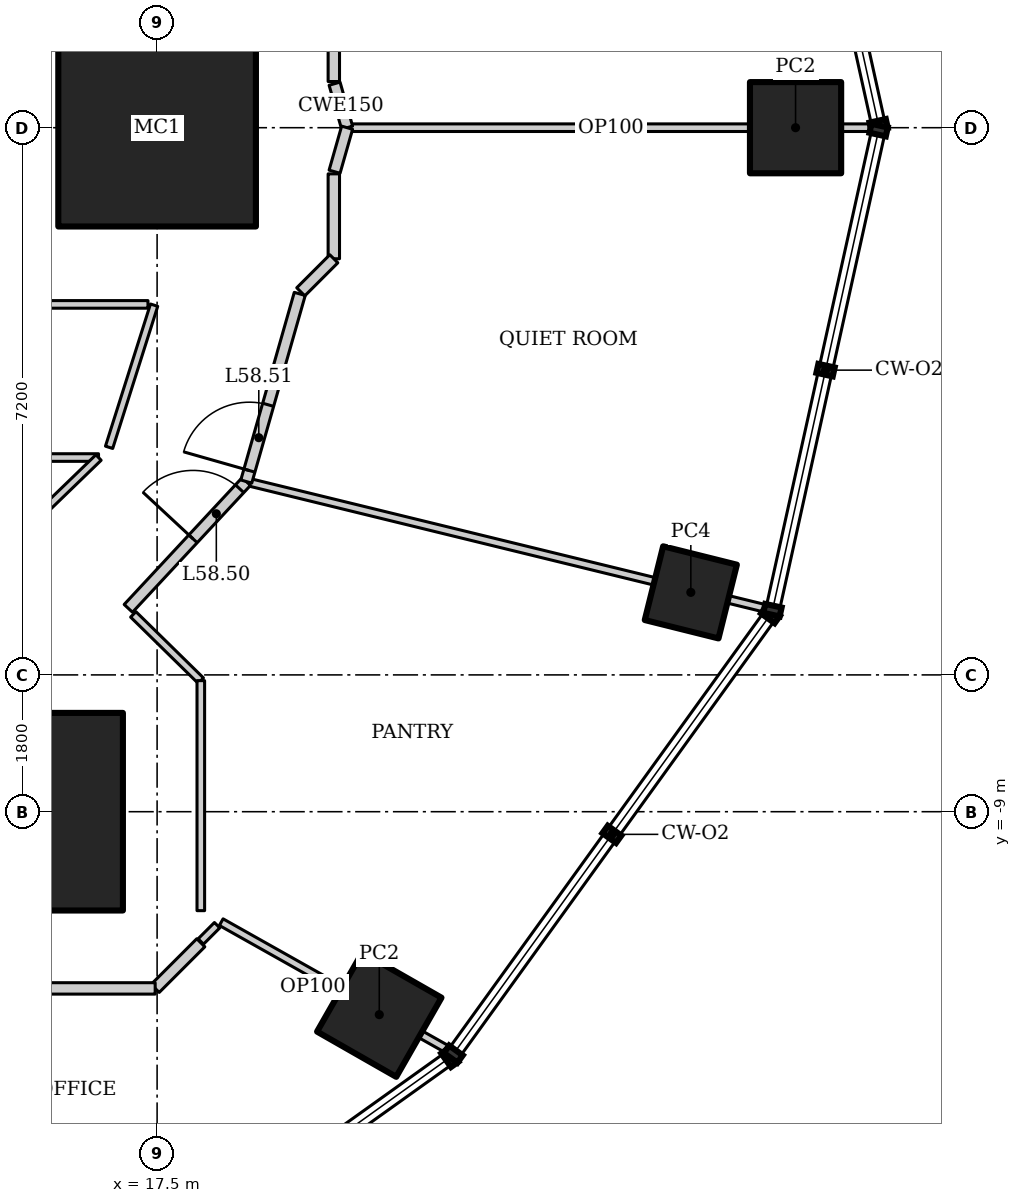
"""IFC4 building model, lengths in metres.
Left out: names, types, materials, properties, quantities, classifications, styles, units other than length and angle.
Written with IfcOpenShell. Run it as: python <this file> out.ifc"""

import sys

from ifc_helpers import new_model, si_unit, direction, frame, frame_2d, origin, origin_2d, place, context, subcontext, project, spatial, rectangle, hollow_rectangle, extrude, element, fill, save


model = new_model("IFC4")
c1 = context("Model", 3, precision=1e-05, world=origin(), true_north=direction((0.0, 1.0)))
c2 = subcontext(c1, "Body", "Model", "MODEL_VIEW")
j1 = project(units=[si_unit("LENGTHUNIT", "METRE"), si_unit("PLANEANGLEUNIT", "RADIAN")], contexts=[c1])
p1 = place(None, origin())
s1 = spatial("IfcSite", under=j1, at=p1, CompositionType="ELEMENT")
p2 = place(p1, origin())
s2 = spatial("IfcBuilding", under=s1, at=p2, CompositionType="ELEMENT")
p3 = place(p2, frame((0.0, 0.0, 249.4)))
s3 = spatial("IfcBuildingStorey", under=s2, at=p3, CompositionType="ELEMENT", Elevation=249.4)
for number, where, z_axis, x_axis in (
    (1, (17.5, 0.0, 0.0), (0.0, 0.0, 1.0), (1.0, 0.0, 0.0)),
    (2, (15.75, -9.0, 0.0), (0.0, 0.0, 1.0), (1.0, 0.0, 0.0)),
):
    element("IfcColumn", number, at=place(p3, frame(where, z_axis=z_axis, x_axis=x_axis)), inside=s3, PredefinedType="COLUMN", context=c2, shape_type="SweptSolid", body=[
        extrude(hollow_rectangle(XDim=2.6, YDim=2.6, WallThickness=0.13, at=origin_2d()), origin(), (0.0, 0.0, 1.0), 4.2),
    ])
for number, where, z_axis, x_axis in (
    (3, (25.9, 0.0, 0.0), (0.0, 0.0, 1.0), (1.0, 0.0, 0.0)),
    (4, (20.423, -11.67, 0.0), (0.0, 0.0, 1.0), (0.496, 0.868, 0.0)),
):
    element("IfcColumn", number, at=place(p3, frame(where, z_axis=z_axis, x_axis=x_axis)), inside=s3, PredefinedType="COLUMN", context=c2, shape_type="SweptSolid", body=[
        extrude(hollow_rectangle(XDim=1.2, YDim=1.2, WallThickness=0.1, at=origin_2d()), origin(), (0.0, 0.0, 1.0), 4.2),
    ])
p4 = place(p3, frame((24.522, -6.114, 0.0), z_axis=(0.0, 0.0, 1.0), x_axis=(0.2419218956, 0.970295726276, 0.0)))
e5 = element("IfcColumn", 5, at=p4, inside=s3, PredefinedType="COLUMN", context=c2, shape_type="SweptSolid", body=[
    extrude(hollow_rectangle(XDim=1.0, YDim=1.0, WallThickness=0.08, at=origin_2d()), origin(), (0.0, 0.0, 1.0), 4.2),
])
p5 = place(p3, frame((26.944, 0.0, 0.0), z_axis=(0.0, 0.0, 1.0), x_axis=(-1.0, 0.0, 0.0)))
e6 = element("IfcWall", 6, at=p5, inside=s3, PredefinedType="PARTITIONING", context=c2, shape_type="SweptSolid", body=[
    extrude(rectangle(XDim=6.944, YDim=0.1, at=frame_2d((3.472, 0.0))), origin(), (0.0, 0.0, 1.0), 3.349),
])
p6 = place(p3, frame((25.543, -6.335, 0.0), z_axis=(0.0, 0.0, 1.0), x_axis=(-0.971384494438, 0.237512450129, 0.0)))
e7 = element("IfcWall", 7, at=p6, inside=s3, PredefinedType="PARTITIONING", context=c2, shape_type="SweptSolid", body=[
    extrude(rectangle(XDim=7.072, YDim=0.1, at=frame_2d((3.536, 0.0))), origin(), (0.0, 0.0, 1.0), 3.108),
])
p7 = place(p3, frame((13.0, -4.34, 0.0), z_axis=(0.0, 0.0, 1.0), x_axis=(1.0, 0.0, 0.0)))
e8 = element("IfcWall", 8, at=p7, inside=s3, PredefinedType="PARTITIONING", context=c2, shape_type="SweptSolid", body=[
    extrude(rectangle(XDim=3.729, YDim=0.1, at=frame_2d((1.865, 0.0))), origin(), (0.0, 0.0, 1.0), 4.05),
])
p8 = place(p3, frame((21.358, -12.15, 0.0), z_axis=(0.0, 0.0, 1.0), x_axis=(-0.871494482514, 0.49040530885, 0.0)))
e9 = element("IfcWall", 9, at=p8, inside=s3, PredefinedType="PARTITIONING", context=c2, shape_type="SweptSolid", body=[
    extrude(rectangle(XDim=3.459, YDim=0.1, at=frame_2d((1.73, 0.0))), origin(), (0.0, 0.0, 1.0), 3.522),
])
p9 = place(p3, frame((17.121, -6.325, 0.0), z_axis=(0.0, 0.0, 1.0), x_axis=(0.680985069419, 0.732297299755, 0.0)))
e10 = element("IfcWall", 10, at=p9, inside=s3, PredefinedType="PARTITIONING", context=c2, shape_type="SweptSolid", body=[
    extrude(rectangle(XDim=2.279, YDim=0.15, at=frame_2d((1.14, 0.0))), origin(), (0.0, 0.0, 1.0), 4.05),
])
p10 = place(p9, frame((1.25, 0.0, 0.0)))
e11 = element("IfcOpeningElement", 11, at=p10, cuts=e10, PredefinedType="OPENING", context=c2, shape_type="SweptSolid", body=[
    extrude(rectangle(XDim=0.9, YDim=2.1, at=frame_2d((0.45, 1.05))), frame((0.0, 0.085, 0.0), z_axis=(0.0, -1.0, 0.0), x_axis=(1.0, 0.0, 0.0)), (0.0, 0.0, 1.0), 0.17),
])
p11 = place(p3, frame((16.729, -4.34, 0.0), z_axis=(0.0, 0.0, 1.0), x_axis=(-0.718798647558, -0.695218314107, 0.0)))
e12 = element("IfcWall", 12, at=p11, inside=s3, PredefinedType="PARTITIONING", context=c2, shape_type="SweptSolid", body=[
    extrude(rectangle(XDim=3.344, YDim=0.1, at=frame_2d((1.672, 0.0))), origin(), (0.0, 0.0, 1.0), 4.05),
])
p12 = place(p11, frame((1.9, 0.0, 0.0)))
e13 = element("IfcOpeningElement", 13, at=p12, cuts=e12, PredefinedType="OPENING", context=c2, shape_type="SweptSolid", body=[
    extrude(rectangle(XDim=0.9, YDim=2.1, at=frame_2d((0.45, 1.05))), frame((0.0, 0.06, 0.0), z_axis=(0.0, -1.0, 0.0), x_axis=(1.0, 0.0, 0.0)), (0.0, 0.0, 1.0), 0.12),
])
p13 = place(p3, frame((18.075, -10.725, 0.0), z_axis=(0.0, 0.0, 1.0), x_axis=(-0.707106781187, -0.707106781187, 0.0)))
e14 = element("IfcWall", 14, at=p13, inside=s3, PredefinedType="PARTITIONING", context=c2, shape_type="SweptSolid", body=[
    extrude(rectangle(XDim=0.849, YDim=0.15, at=frame_2d((0.425, 0.0))), origin(), (0.0, 0.0, 1.0), 4.05),
])
p14 = place(p3, frame((17.475, -11.325, 0.0), z_axis=(0.0, 0.0, 1.0), x_axis=(-1.0, 0.0, 0.0)))
e15 = element("IfcWall", 15, at=p14, inside=s3, PredefinedType="PARTITIONING", context=c2, shape_type="SweptSolid", body=[
    extrude(rectangle(XDim=3.449, YDim=0.15, at=frame_2d((1.725, 0.0))), origin(), (0.0, 0.0, 1.0), 4.05),
])
p15 = place(p3, frame((18.289, -10.493, 0.0), z_axis=(0.0, 0.0, 1.0), x_axis=(-0.707509576179, -0.706703756616, 0.0)))
e16 = element("IfcWall", 16, at=p15, inside=s3, PredefinedType="PARTITIONING", context=c2, shape_type="SweptSolid", body=[
    extrude(rectangle(XDim=0.303, YDim=0.1, at=frame_2d((0.151, 0.0))), origin(), (0.0, 0.0, 1.0), 4.05),
])
p16 = place(p3, frame((17.187, -6.404, 0.0), z_axis=(0.0, 0.0, 1.0), x_axis=(0.713842064016, -0.700306723973, 0.0)))
e17 = element("IfcWall", 17, at=p16, inside=s3, PredefinedType="PARTITIONING", context=c2, shape_type="SweptSolid", body=[
    extrude(rectangle(XDim=1.245, YDim=0.1, at=frame_2d((0.622, 0.0))), origin(), (0.0, 0.0, 1.0), 4.05),
])
p17 = place(p3, frame((18.075, -7.275, 0.0), z_axis=(0.0, 0.0, 1.0), x_axis=(0.0, -1.0, 0.0)))
e18 = element("IfcWall", 18, at=p17, inside=s3, PredefinedType="PARTITIONING", context=c2, shape_type="SweptSolid", body=[
    extrude(rectangle(XDim=3.027, YDim=0.1, at=frame_2d((1.513, 0.0))), origin(), (0.0, 0.0, 1.0), 3.601),
])
p18 = place(p3, frame((20.0, 0.0, 0.0), z_axis=(0.0, 0.0, 1.0), x_axis=(-0.27407847996, 0.961707329089, 0.0)))
e19 = element("IfcWall", 19, at=p18, inside=s3, PredefinedType="PARTITIONING", context=c2, shape_type="SweptSolid", body=[
    extrude(rectangle(XDim=0.602, YDim=0.15, at=frame_2d((0.301, 0.0))), origin(), (0.0, 0.0, 1.0), 4.05),
])
p19 = place(p3, frame((18.673, -4.656, 0.0), z_axis=(0.0, 0.0, 1.0), x_axis=(0.274067949327, 0.961710330168, 0.0)))
e20 = element("IfcWall", 20, at=p19, inside=s3, PredefinedType="PARTITIONING", context=c2, shape_type="SweptSolid", body=[
    extrude(rectangle(XDim=2.567, YDim=0.15, at=frame_2d((1.284, 0.0))), origin(), (0.0, 0.0, 1.0), 4.05),
])
p20 = place(p19, frame((0.15, 0.0, 0.0)))
e21 = element("IfcOpeningElement", 21, at=p20, cuts=e20, PredefinedType="OPENING", context=c2, shape_type="SweptSolid", body=[
    extrude(rectangle(XDim=0.9, YDim=2.1, at=frame_2d((0.45, 1.05))), frame((0.0, 0.085, 0.0), z_axis=(0.0, -1.0, 0.0), x_axis=(1.0, 0.0, 0.0)), (0.0, 0.0, 1.0), 0.17),
])
p21 = place(p3, frame((19.835, -0.579, 0.0), z_axis=(0.0, 0.0, 1.0), x_axis=(0.27407847996, 0.961707329089, 0.0)))
e22 = element("IfcWall", 22, at=p21, inside=s3, PredefinedType="PARTITIONING", context=c2, shape_type="SweptSolid", body=[
    extrude(rectangle(XDim=0.602, YDim=0.15, at=frame_2d((0.301, 0.0))), origin(), (0.0, 0.0, 1.0), 4.05),
])
p22 = place(p3, frame((17.46, -2.335, 0.0), z_axis=(0.0, 0.0, 1.0), x_axis=(-0.301821975729, -0.953364303384, 0.0)))
e23 = element("IfcWall", 23, at=p22, inside=s3, PredefinedType="PARTITIONING", context=c2, shape_type="SweptSolid", body=[
    extrude(rectangle(XDim=1.962, YDim=0.1, at=frame_2d((0.981, 0.0))), origin(), (0.0, 0.0, 1.0), 4.05),
])
p23 = place(p3, frame((17.38, -2.325, 0.0), z_axis=(0.0, 0.0, 1.0), x_axis=(-1.0, 0.0, 0.0)))
e24 = element("IfcWall", 24, at=p23, inside=s3, PredefinedType="PARTITIONING", context=c2, shape_type="SweptSolid", body=[
    extrude(rectangle(XDim=1.604, YDim=0.1, at=frame_2d((0.802, 0.0))), origin(), (0.0, 0.0, 1.0), 4.05),
])
for number, where, z_axis, x_axis in (
    (25, (19.825, 1.725, 0.0), (0.0, 0.0, 1.0), (0.0, -1.0, 0.0)),
    (26, (19.825, -0.607, 0.0), (0.0, 0.0, 1.0), (0.0, -1.0, 0.0)),
):
    element("IfcWall", number, at=place(p3, frame(where, z_axis=z_axis, x_axis=x_axis)), inside=s3, PredefinedType="PARTITIONING", context=c2, shape_type="SweptSolid", body=[
        extrude(rectangle(XDim=1.117, YDim=0.15, at=frame_2d((0.559, 0.0))), origin(), (0.0, 0.0, 1.0), 4.05),
    ])
p24 = place(p3, frame((19.825, -1.725, 0.0), z_axis=(0.0, 0.0, 1.0), x_axis=(-0.707106781187, -0.707106781187, 0.0)))
e27 = element("IfcWall", 27, at=p24, inside=s3, PredefinedType="PARTITIONING", context=c2, shape_type="SweptSolid", body=[
    extrude(rectangle(XDim=0.615, YDim=0.15, at=frame_2d((0.308, 0.0))), origin(), (0.0, 0.0, 1.0), 4.05),
])
p25 = place(p10, origin())
e28 = element("IfcDoor", 28, at=p25, inside=s3, OperationType="SINGLE_SWING_LEFT", PredefinedType="DOOR", context=c2, shape_type="SweptSolid", body=[
    extrude(rectangle(XDim=0.9, YDim=2.1, at=frame_2d((0.45, 1.05))), frame((0.0, 0.025, 0.0), z_axis=(0.0, -1.0, 0.0), x_axis=(1.0, 0.0, 0.0)), (0.0, 0.0, 1.0), 0.05),
])
fill(e11, e28)
p26 = place(p20, origin())
e29 = element("IfcDoor", 29, at=p26, inside=s3, OperationType="SINGLE_SWING_LEFT", PredefinedType="DOOR", context=c2, shape_type="SweptSolid", body=[
    extrude(rectangle(XDim=0.9, YDim=2.1, at=frame_2d((0.45, 1.05))), frame((0.0, 0.025, 0.0), z_axis=(0.0, -1.0, 0.0), x_axis=(1.0, 0.0, 0.0)), (0.0, 0.0, 1.0), 0.05),
])
fill(e21, e29)
save(model, sys.argv[1])
